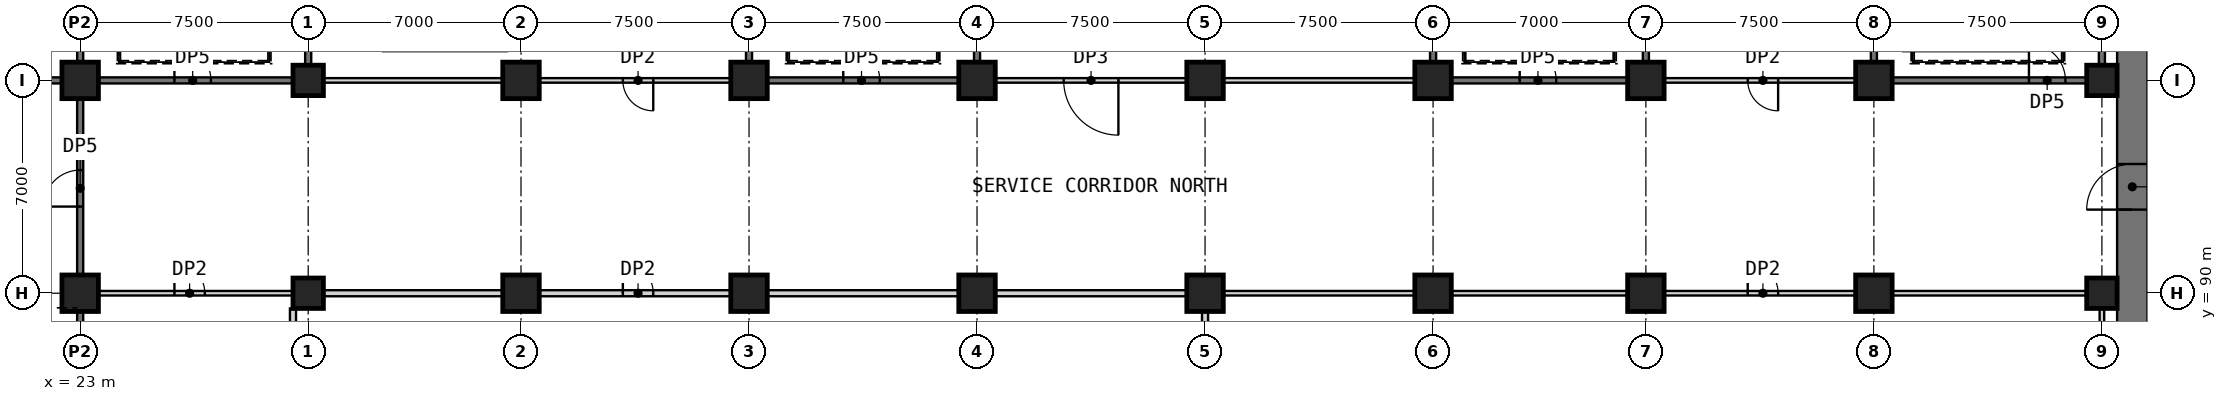
"""IFC4 building model, lengths in metres.
Left out: names, types, materials, properties, quantities, classifications, styles, units other than length and angle.
Written with IfcOpenShell. Run it as: python <this file> out.ifc"""

import sys

from ifc_helpers import new_model, si_unit, direction, frame, frame_2d, origin, origin_2d, place, context, subcontext, project, spatial, rectangle, extrude, element, fill, save


model = new_model("IFC4")
c1 = context("Model", 3, precision=1e-05, world=origin(), true_north=direction((0.0, 1.0)))
c2 = subcontext(c1, "Body", "Model", "MODEL_VIEW")
j1 = project(units=[si_unit("LENGTHUNIT", "METRE"), si_unit("PLANEANGLEUNIT", "RADIAN")], contexts=[c1])
p1 = place(None, origin())
s1 = spatial("IfcSite", under=j1, at=p1, CompositionType="ELEMENT")
p2 = place(p1, origin())
s2 = spatial("IfcBuilding", under=s1, at=p2, CompositionType="ELEMENT")
p3 = place(p2, frame((0.0, 0.0, -6.0)))
s3 = spatial("IfcBuildingStorey", under=s2, at=p3, CompositionType="ELEMENT", Elevation=-6.0)
p4 = place(p3, frame((90.5, 25.0, 0.0), z_axis=(0.0, 0.0, 1.0), x_axis=(0.0, 1.0, 0.0)))
e1 = element("IfcWall", 1, at=p4, inside=s3, PredefinedType="SHEAR", context=c2, shape_type="SweptSolid", body=[
    extrude(rectangle(XDim=92.5, YDim=1.0, at=frame_2d((46.25, 0.0))), origin(), (0.0, 0.0, 1.0), 4.8),
])
p5 = place(p4, frame((23.15, 0.0, 0.0)))
e2 = element("IfcOpeningElement", 2, at=p5, cuts=e1, PredefinedType="OPENING", context=c2, shape_type="SweptSolid", body=[
    extrude(rectangle(XDim=1.5, YDim=2.1, at=frame_2d((0.75, 1.05))), frame((0.0, 0.51, 0.0), z_axis=(0.0, -1.0, 0.0), x_axis=(1.0, 0.0, 0.0)), (0.0, 0.0, 1.0), 1.02),
])
p6 = place(p4, frame((67.75, 0.0, 0.0)))
e3 = element("IfcOpeningElement", 3, at=p6, cuts=e1, PredefinedType="OPENING", context=c2, shape_type="SweptSolid", body=[
    extrude(rectangle(XDim=1.5, YDim=2.1, at=frame_2d((0.75, 1.05))), frame((0.0, 0.51, 0.0), z_axis=(0.0, -1.0, 0.0), x_axis=(1.0, 0.0, 0.0)), (0.0, 0.0, 1.0), 1.02),
])
for number, where, z_axis, x_axis in (
    (4, (30.5, 90.0, 0.0), (0.0, 0.0, 1.0), (1.0, 0.0, 0.0)),
    (5, (30.5, 97.0, 0.0), (0.0, 0.0, 1.0), (1.0, 0.0, 0.0)),
):
    element("IfcColumn", number, at=place(p3, frame(where, z_axis=z_axis, x_axis=x_axis)), inside=s3, PredefinedType="COLUMN", context=c2, shape_type="SweptSolid", body=[
        extrude(rectangle(XDim=1.0, YDim=1.0, at=origin_2d()), origin(), (0.0, 0.0, 1.0), 6.0),
    ])
for number, where, z_axis, x_axis in (
    (6, (37.5, 90.0, 0.0), (0.0, 0.0, 1.0), (1.0, 0.0, 0.0)),
    (7, (37.5, 97.0, 0.0), (0.0, 0.0, 1.0), (1.0, 0.0, 0.0)),
    (8, (45.0, 90.0, 0.0), (0.0, 0.0, 1.0), (1.0, 0.0, 0.0)),
    (9, (45.0, 97.0, 0.0), (0.0, 0.0, 1.0), (1.0, 0.0, 0.0)),
    (10, (52.5, 90.0, 0.0), (0.0, 0.0, 1.0), (1.0, 0.0, 0.0)),
    (11, (52.5, 97.0, 0.0), (0.0, 0.0, 1.0), (1.0, 0.0, 0.0)),
    (12, (60.0, 90.0, 0.0), (0.0, 0.0, 1.0), (1.0, 0.0, 0.0)),
    (13, (60.0, 97.0, 0.0), (0.0, 0.0, 1.0), (1.0, 0.0, 0.0)),
    (14, (67.5, 90.0, 0.0), (0.0, 0.0, 1.0), (1.0, 0.0, 0.0)),
    (15, (67.5, 97.0, 0.0), (0.0, 0.0, 1.0), (1.0, 0.0, 0.0)),
    (16, (74.5, 90.0, 0.0), (0.0, 0.0, 1.0), (1.0, 0.0, 0.0)),
    (17, (74.5, 97.0, 0.0), (0.0, 0.0, 1.0), (1.0, 0.0, 0.0)),
    (18, (82.0, 90.0, 0.0), (0.0, 0.0, 1.0), (1.0, 0.0, 0.0)),
    (19, (82.0, 97.0, 0.0), (0.0, 0.0, 1.0), (1.0, 0.0, 0.0)),
):
    element("IfcColumn", number, at=place(p3, frame(where, z_axis=z_axis, x_axis=x_axis)), inside=s3, PredefinedType="COLUMN", context=c2, shape_type="SweptSolid", body=[
        extrude(rectangle(XDim=1.2, YDim=1.2, at=origin_2d()), origin(), (0.0, 0.0, 1.0), 6.0),
    ])
for number, where, z_axis, x_axis in (
    (20, (89.5, 90.0, 0.0), (0.0, 0.0, 1.0), (1.0, 0.0, 0.0)),
    (21, (89.5, 97.0, 0.0), (0.0, 0.0, 1.0), (1.0, 0.0, 0.0)),
):
    element("IfcColumn", number, at=place(p3, frame(where, z_axis=z_axis, x_axis=x_axis)), inside=s3, PredefinedType="COLUMN", context=c2, shape_type="SweptSolid", body=[
        extrude(rectangle(XDim=1.0, YDim=1.0, at=origin_2d()), origin(), (0.0, 0.0, 1.0), 6.0),
    ])
for number, where, z_axis, x_axis in (
    (22, (23.0, 90.0, 0.0), (0.0, 0.0, 1.0), (1.0, 0.0, 0.0)),
    (23, (23.0, 97.0, 0.0), (0.0, 0.0, 1.0), (1.0, 0.0, 0.0)),
):
    element("IfcColumn", number, at=place(p3, frame(where, z_axis=z_axis, x_axis=x_axis)), inside=s3, PredefinedType="COLUMN", context=c2, shape_type="SweptSolid", body=[
        extrude(rectangle(XDim=1.2, YDim=1.2, at=origin_2d()), origin(), (0.0, 0.0, 1.0), 6.0),
    ])
p7 = place(p3, frame((23.6, 90.0, 0.0), z_axis=(0.0, 0.0, 1.0), x_axis=(1.0, 0.0, 0.0)))
e24 = element("IfcWall", 24, at=p7, inside=s3, PredefinedType="PARTITIONING", context=c2, shape_type="SweptSolid", body=[
    extrude(rectangle(XDim=6.4, YDim=0.15, at=frame_2d((3.2, 0.0))), origin(), (0.0, 0.0, 1.0), 5.7),
])
p8 = place(p7, frame((2.5, 0.0, 0.0)))
e25 = element("IfcOpeningElement", 25, at=p8, cuts=e24, PredefinedType="OPENING", context=c2, shape_type="SweptSolid", body=[
    extrude(rectangle(XDim=1.0, YDim=2.1, at=frame_2d((0.5, 1.05))), frame((0.0, 0.085, 0.0), z_axis=(0.0, -1.0, 0.0), x_axis=(1.0, 0.0, 0.0)), (0.0, 0.0, 1.0), 0.17),
])
p9 = place(p3, frame((31.0, 90.0, 0.0), z_axis=(0.0, 0.0, 1.0), x_axis=(1.0, 0.0, 0.0)))
e26 = element("IfcWall", 26, at=p9, inside=s3, PredefinedType="PARTITIONING", context=c2, shape_type="SweptSolid", body=[
    extrude(rectangle(XDim=5.9, YDim=0.2, at=frame_2d((2.95, 0.0))), origin(), (0.0, 0.0, 1.0), 5.7),
])
p10 = place(p3, frame((38.1, 90.0, 0.0), z_axis=(0.0, 0.0, 1.0), x_axis=(1.0, 0.0, 0.0)))
e27 = element("IfcWall", 27, at=p10, inside=s3, PredefinedType="PARTITIONING", context=c2, shape_type="SweptSolid", body=[
    extrude(rectangle(XDim=6.3, YDim=0.2, at=frame_2d((3.15, 0.0))), origin(), (0.0, 0.0, 1.0), 5.7),
])
p11 = place(p10, frame((2.75, 0.0, 0.0)))
e28 = element("IfcOpeningElement", 28, at=p11, cuts=e27, PredefinedType="OPENING", context=c2, shape_type="SweptSolid", body=[
    extrude(rectangle(XDim=1.0, YDim=2.1, at=frame_2d((0.5, 1.05))), frame((0.0, 0.11, 0.0), z_axis=(0.0, -1.0, 0.0), x_axis=(1.0, 0.0, 0.0)), (0.0, 0.0, 1.0), 0.22),
])
for number, where, z_axis, x_axis in (
    (29, (45.6, 90.0, 0.0), (0.0, 0.0, 1.0), (1.0, 0.0, 0.0)),
    (30, (53.1, 90.0, 0.0), (0.0, 0.0, 1.0), (1.0, 0.0, 0.0)),
):
    element("IfcWall", number, at=place(p3, frame(where, z_axis=z_axis, x_axis=x_axis)), inside=s3, PredefinedType="PARTITIONING", context=c2, shape_type="SweptSolid", body=[
        extrude(rectangle(XDim=6.3, YDim=0.2, at=frame_2d((3.15, 0.0))), origin(), (0.0, 0.0, 1.0), 5.7),
    ])
p12 = place(p3, frame((60.6, 90.0, 0.0), z_axis=(0.0, 0.0, 1.0), x_axis=(1.0, 0.0, 0.0)))
e31 = element("IfcWall", 31, at=p12, inside=s3, PredefinedType="PARTITIONING", context=c2, shape_type="SweptSolid", body=[
    extrude(rectangle(XDim=6.3, YDim=0.15, at=frame_2d((3.15, 0.0))), origin(), (0.0, 0.0, 1.0), 5.7),
])
p13 = place(p3, frame((68.1, 90.0, 0.0), z_axis=(0.0, 0.0, 1.0), x_axis=(1.0, 0.0, 0.0)))
e32 = element("IfcWall", 32, at=p13, inside=s3, PredefinedType="PARTITIONING", context=c2, shape_type="SweptSolid", body=[
    extrude(rectangle(XDim=5.8, YDim=0.15, at=frame_2d((2.9, 0.0))), origin(), (0.0, 0.0, 1.0), 5.7),
])
p14 = place(p3, frame((75.1, 90.0, 0.0), z_axis=(0.0, 0.0, 1.0), x_axis=(1.0, 0.0, 0.0)))
e33 = element("IfcWall", 33, at=p14, inside=s3, PredefinedType="PARTITIONING", context=c2, shape_type="SweptSolid", body=[
    extrude(rectangle(XDim=6.3, YDim=0.15, at=frame_2d((3.15, 0.0))), origin(), (0.0, 0.0, 1.0), 5.7),
])
p15 = place(p14, frame((2.75, 0.0, 0.0)))
e34 = element("IfcOpeningElement", 34, at=p15, cuts=e33, PredefinedType="OPENING", context=c2, shape_type="SweptSolid", body=[
    extrude(rectangle(XDim=1.0, YDim=2.1, at=frame_2d((0.5, 1.05))), frame((0.0, 0.085, 0.0), z_axis=(0.0, -1.0, 0.0), x_axis=(1.0, 0.0, 0.0)), (0.0, 0.0, 1.0), 0.17),
])
p16 = place(p3, frame((82.6, 90.0, 0.0), z_axis=(0.0, 0.0, 1.0), x_axis=(1.0, 0.0, 0.0)))
e35 = element("IfcWall", 35, at=p16, inside=s3, PredefinedType="PARTITIONING", context=c2, shape_type="SweptSolid", body=[
    extrude(rectangle(XDim=6.4, YDim=0.15, at=frame_2d((3.2, 0.0))), origin(), (0.0, 0.0, 1.0), 5.7),
])
p17 = place(p3, frame((16.1, 97.0, 0.0), z_axis=(0.0, 0.0, 1.0), x_axis=(1.0, 0.0, 0.0)))
e36 = element("IfcWall", 36, at=p17, inside=s3, PredefinedType="SHEAR", context=c2, shape_type="SweptSolid", body=[
    extrude(rectangle(XDim=6.3, YDim=0.2, at=frame_2d((3.15, 0.0))), origin(), (0.0, 0.0, 1.0), 5.7),
])
p18 = place(p3, frame((23.6, 97.0, 0.0), z_axis=(0.0, 0.0, 1.0), x_axis=(1.0, 0.0, 0.0)))
e37 = element("IfcWall", 37, at=p18, inside=s3, PredefinedType="SHEAR", context=c2, shape_type="SweptSolid", body=[
    extrude(rectangle(XDim=6.4, YDim=0.2, at=frame_2d((3.2, 0.0))), origin(), (0.0, 0.0, 1.0), 5.7),
])
p19 = place(p18, frame((2.5, 0.0, 0.0)))
e38 = element("IfcOpeningElement", 38, at=p19, cuts=e37, PredefinedType="OPENING", context=c2, shape_type="SweptSolid", body=[
    extrude(rectangle(XDim=1.2, YDim=2.1, at=frame_2d((0.6, 1.05))), frame((0.0, 0.11, 0.0), z_axis=(0.0, -1.0, 0.0), x_axis=(1.0, 0.0, 0.0)), (0.0, 0.0, 1.0), 0.22),
])
p20 = place(p3, frame((31.0, 97.0, 0.0), z_axis=(0.0, 0.0, 1.0), x_axis=(1.0, 0.0, 0.0)))
e39 = element("IfcWall", 39, at=p20, inside=s3, PredefinedType="PARTITIONING", context=c2, shape_type="SweptSolid", body=[
    extrude(rectangle(XDim=5.9, YDim=0.15, at=frame_2d((2.95, 0.0))), origin(), (0.0, 0.0, 1.0), 5.7),
])
p21 = place(p3, frame((44.4, 97.0, 0.0), z_axis=(0.0, 0.0, 1.0), x_axis=(-1.0, 0.0, 0.0)))
e40 = element("IfcWall", 40, at=p21, inside=s3, PredefinedType="PARTITIONING", context=c2, shape_type="SweptSolid", body=[
    extrude(rectangle(XDim=6.3, YDim=0.15, at=frame_2d((3.15, 0.0))), origin(), (0.0, 0.0, 1.0), 5.7),
])
p22 = place(p21, frame((2.55, 0.0, 0.0)))
e41 = element("IfcOpeningElement", 41, at=p22, cuts=e40, PredefinedType="OPENING", context=c2, shape_type="SweptSolid", body=[
    extrude(rectangle(XDim=1.0, YDim=2.1, at=frame_2d((0.5, 1.05))), frame((0.0, 0.085, 0.0), z_axis=(0.0, -1.0, 0.0), x_axis=(1.0, 0.0, 0.0)), (0.0, 0.0, 1.0), 0.17),
])
p23 = place(p3, frame((45.6, 97.0, 0.0), z_axis=(0.0, 0.0, 1.0), x_axis=(1.0, 0.0, 0.0)))
e42 = element("IfcWall", 42, at=p23, inside=s3, PredefinedType="SHEAR", context=c2, shape_type="SweptSolid", body=[
    extrude(rectangle(XDim=6.3, YDim=0.2, at=frame_2d((3.15, 0.0))), origin(), (0.0, 0.0, 1.0), 5.7),
])
p24 = place(p23, frame((2.5, 0.0, 0.0)))
e43 = element("IfcOpeningElement", 43, at=p24, cuts=e42, PredefinedType="OPENING", context=c2, shape_type="SweptSolid", body=[
    extrude(rectangle(XDim=1.2, YDim=2.1, at=frame_2d((0.6, 1.05))), frame((0.0, 0.11, 0.0), z_axis=(0.0, -1.0, 0.0), x_axis=(1.0, 0.0, 0.0)), (0.0, 0.0, 1.0), 0.22),
])
p25 = place(p3, frame((59.4, 97.0, 0.0), z_axis=(0.0, 0.0, 1.0), x_axis=(-1.0, 0.0, 0.0)))
e44 = element("IfcWall", 44, at=p25, inside=s3, PredefinedType="PARTITIONING", context=c2, shape_type="SweptSolid", body=[
    extrude(rectangle(XDim=6.3, YDim=0.15, at=frame_2d((3.15, 0.0))), origin(), (0.0, 0.0, 1.0), 5.7),
])
p26 = place(p25, frame((2.25, 0.0, 0.0)))
e45 = element("IfcOpeningElement", 45, at=p26, cuts=e44, PredefinedType="OPENING", context=c2, shape_type="SweptSolid", body=[
    extrude(rectangle(XDim=1.8, YDim=2.4, at=frame_2d((0.9, 1.2))), frame((0.0, 0.085, 0.0), z_axis=(0.0, -1.0, 0.0), x_axis=(1.0, 0.0, 0.0)), (0.0, 0.0, 1.0), 0.17),
])
p27 = place(p3, frame((60.6, 97.0, 0.0), z_axis=(0.0, 0.0, 1.0), x_axis=(1.0, 0.0, 0.0)))
e46 = element("IfcWall", 46, at=p27, inside=s3, PredefinedType="PARTITIONING", context=c2, shape_type="SweptSolid", body=[
    extrude(rectangle(XDim=6.3, YDim=0.15, at=frame_2d((3.15, 0.0))), origin(), (0.0, 0.0, 1.0), 5.7),
])
p28 = place(p3, frame((68.1, 97.0, 0.0), z_axis=(0.0, 0.0, 1.0), x_axis=(1.0, 0.0, 0.0)))
e47 = element("IfcWall", 47, at=p28, inside=s3, PredefinedType="SHEAR", context=c2, shape_type="SweptSolid", body=[
    extrude(rectangle(XDim=5.8, YDim=0.2, at=frame_2d((2.9, 0.0))), origin(), (0.0, 0.0, 1.0), 5.7),
])
p29 = place(p28, frame((2.25, 0.0, 0.0)))
e48 = element("IfcOpeningElement", 48, at=p29, cuts=e47, PredefinedType="OPENING", context=c2, shape_type="SweptSolid", body=[
    extrude(rectangle(XDim=1.2, YDim=2.1, at=frame_2d((0.6, 1.05))), frame((0.0, 0.11, 0.0), z_axis=(0.0, -1.0, 0.0), x_axis=(1.0, 0.0, 0.0)), (0.0, 0.0, 1.0), 0.22),
])
p30 = place(p3, frame((81.4, 97.0, 0.0), z_axis=(0.0, 0.0, 1.0), x_axis=(-1.0, 0.0, 0.0)))
e49 = element("IfcWall", 49, at=p30, inside=s3, PredefinedType="PARTITIONING", context=c2, shape_type="SweptSolid", body=[
    extrude(rectangle(XDim=6.3, YDim=0.15, at=frame_2d((3.15, 0.0))), origin(), (0.0, 0.0, 1.0), 5.7),
])
p31 = place(p30, frame((2.55, 0.0, 0.0)))
e50 = element("IfcOpeningElement", 50, at=p31, cuts=e49, PredefinedType="OPENING", context=c2, shape_type="SweptSolid", body=[
    extrude(rectangle(XDim=1.0, YDim=2.1, at=frame_2d((0.5, 1.05))), frame((0.0, 0.085, 0.0), z_axis=(0.0, -1.0, 0.0), x_axis=(1.0, 0.0, 0.0)), (0.0, 0.0, 1.0), 0.17),
])
p32 = place(p3, frame((82.6, 97.0, 0.0), z_axis=(0.0, 0.0, 1.0), x_axis=(1.0, 0.0, 0.0)))
e51 = element("IfcWall", 51, at=p32, inside=s3, PredefinedType="SHEAR", context=c2, shape_type="SweptSolid", body=[
    extrude(rectangle(XDim=6.4, YDim=0.2, at=frame_2d((3.2, 0.0))), origin(), (0.0, 0.0, 1.0), 5.7),
])
p33 = place(p32, frame((4.5, 0.0, 0.0)))
e52 = element("IfcOpeningElement", 52, at=p33, cuts=e51, PredefinedType="OPENING", context=c2, shape_type="SweptSolid", body=[
    extrude(rectangle(XDim=1.2, YDim=2.1, at=frame_2d((0.6, 1.05))), frame((0.0, 0.11, 0.0), z_axis=(0.0, -1.0, 0.0), x_axis=(1.0, 0.0, 0.0)), (0.0, 0.0, 1.0), 0.22),
])
p34 = place(p3, frame((23.0, 83.1, 0.0), z_axis=(0.0, 0.0, 1.0), x_axis=(0.0, 1.0, 0.0)))
e53 = element("IfcWall", 53, at=p34, inside=s3, PredefinedType="SHEAR", context=c2, shape_type="SweptSolid", body=[
    extrude(rectangle(XDim=6.3, YDim=0.2, at=frame_2d((3.15, 0.0))), origin(), (0.0, 0.0, 1.0), 5.7),
])
p35 = place(p3, frame((23.0, 90.6, 0.0), z_axis=(0.0, 0.0, 1.0), x_axis=(0.0, 1.0, 0.0)))
e54 = element("IfcWall", 54, at=p35, inside=s3, PredefinedType="SHEAR", context=c2, shape_type="SweptSolid", body=[
    extrude(rectangle(XDim=5.8, YDim=0.2, at=frame_2d((2.9, 0.0))), origin(), (0.0, 0.0, 1.0), 5.7),
])
p36 = place(p35, frame((2.25, 0.0, 0.0)))
e55 = element("IfcOpeningElement", 55, at=p36, cuts=e54, PredefinedType="OPENING", context=c2, shape_type="SweptSolid", body=[
    extrude(rectangle(XDim=1.2, YDim=2.1, at=frame_2d((0.6, 1.05))), frame((0.0, 0.11, 0.0), z_axis=(0.0, -1.0, 0.0), x_axis=(1.0, 0.0, 0.0)), (0.0, 0.0, 1.0), 0.22),
])
p37 = place(p3, frame((23.0, 97.6, 0.0), z_axis=(0.0, 0.0, 1.0), x_axis=(0.0, 1.0, 0.0)))
e56 = element("IfcWall", 56, at=p37, inside=s3, PredefinedType="SHEAR", context=c2, shape_type="SweptSolid", body=[
    extrude(rectangle(XDim=6.3, YDim=0.2, at=frame_2d((3.15, 0.0))), origin(), (0.0, 0.0, 1.0), 5.7),
])
for number, where, z_axis, x_axis in (
    (57, (30.5, 97.5, 0.0), (0.0, 0.0, 1.0), (0.0, 1.0, 0.0)),
    (58, (45.0, 97.6, 0.0), (0.0, 0.0, 1.0), (0.0, 1.0, 0.0)),
    (59, (52.5, 97.6, 0.0), (0.0, 0.0, 1.0), (0.0, 1.0, 0.0)),
    (60, (67.5, 97.6, 0.0), (0.0, 0.0, 1.0), (0.0, 1.0, 0.0)),
    (61, (74.5, 97.6, 0.0), (0.0, 0.0, 1.0), (0.0, 1.0, 0.0)),
    (62, (82.0, 97.6, 0.0), (0.0, 0.0, 1.0), (0.0, 1.0, 0.0)),
):
    element("IfcWall", number, at=place(p3, frame(where, z_axis=z_axis, x_axis=x_axis)), inside=s3, PredefinedType="SHEAR", context=c2, shape_type="SweptSolid", body=[
        extrude(rectangle(XDim=6.4, YDim=0.2, at=frame_2d((3.2, 0.0))), origin(), (0.0, 0.0, 1.0), 5.7),
    ])
p38 = place(p3, frame((89.5, 83.0, 0.0), z_axis=(0.0, 0.0, 1.0), x_axis=(0.0, 1.0, 0.0)))
e63 = element("IfcWall", 63, at=p38, inside=s3, PredefinedType="PARTITIONING", context=c2, shape_type="SweptSolid", body=[
    extrude(rectangle(XDim=6.5, YDim=0.15, at=frame_2d((3.25, 0.0))), origin(), (0.0, 0.0, 1.0), 5.7),
])
p39 = place(p3, frame((89.5, 97.5, 0.0), z_axis=(0.0, 0.0, 1.0), x_axis=(0.0, 1.0, 0.0)))
e64 = element("IfcWall", 64, at=p39, inside=s3, PredefinedType="SHEAR", context=c2, shape_type="SweptSolid", body=[
    extrude(rectangle(XDim=6.4, YDim=0.2, at=frame_2d((3.2, 0.0))), origin(), (0.0, 0.0, 1.0), 5.7),
])
p40 = place(p3, frame((30.0, 82.6, 0.0), z_axis=(0.0, 0.0, 1.0), x_axis=(0.0, 1.0, 0.0)))
e65 = element("IfcWall", 65, at=p40, inside=s3, PredefinedType="PARTITIONING", context=c2, shape_type="SweptSolid", body=[
    extrude(rectangle(XDim=6.9, YDim=0.2, at=frame_2d((3.45, 0.0))), origin(), (0.0, 0.0, 1.0), 5.7),
])
p41 = place(p3, frame((60.0, 82.6, 0.0), z_axis=(0.0, 0.0, 1.0), x_axis=(0.0, 1.0, 0.0)))
e66 = element("IfcWall", 66, at=p41, inside=s3, PredefinedType="PARTITIONING", context=c2, shape_type="SweptSolid", body=[
    extrude(rectangle(XDim=6.8, YDim=0.2, at=frame_2d((3.4, 0.0))), origin(), (0.0, 0.0, 1.0), 5.7),
])
p42 = place(p8, origin())
e67 = element("IfcDoor", 67, at=p42, inside=s3, OperationType="SINGLE_SWING_LEFT", PredefinedType="DOOR", context=c2, shape_type="SweptSolid", body=[
    extrude(rectangle(XDim=1.0, YDim=2.1, at=frame_2d((0.5, 1.05))), frame((0.0, 0.025, 0.0), z_axis=(0.0, -1.0, 0.0), x_axis=(1.0, 0.0, 0.0)), (0.0, 0.0, 1.0), 0.05),
])
fill(e25, e67)
p43 = place(p11, origin())
e68 = element("IfcDoor", 68, at=p43, inside=s3, OperationType="SINGLE_SWING_LEFT", PredefinedType="DOOR", context=c2, shape_type="SweptSolid", body=[
    extrude(rectangle(XDim=1.0, YDim=2.1, at=frame_2d((0.5, 1.05))), frame((0.0, 0.025, 0.0), z_axis=(0.0, -1.0, 0.0), x_axis=(1.0, 0.0, 0.0)), (0.0, 0.0, 1.0), 0.05),
])
fill(e28, e68)
p44 = place(p15, origin())
e69 = element("IfcDoor", 69, at=p44, inside=s3, OperationType="SINGLE_SWING_LEFT", PredefinedType="DOOR", context=c2, shape_type="SweptSolid", body=[
    extrude(rectangle(XDim=1.0, YDim=2.1, at=frame_2d((0.5, 1.05))), frame((0.0, 0.025, 0.0), z_axis=(0.0, -1.0, 0.0), x_axis=(1.0, 0.0, 0.0)), (0.0, 0.0, 1.0), 0.05),
])
fill(e34, e69)
p45 = place(p19, origin())
e70 = element("IfcDoor", 70, at=p45, inside=s3, OperationType="SINGLE_SWING_LEFT", PredefinedType="DOOR", context=c2, shape_type="SweptSolid", body=[
    extrude(rectangle(XDim=1.2, YDim=2.1, at=frame_2d((0.6, 1.05))), frame((0.0, 0.025, 0.0), z_axis=(0.0, -1.0, 0.0), x_axis=(1.0, 0.0, 0.0)), (0.0, 0.0, 1.0), 0.05),
])
fill(e38, e70)
p46 = place(p22, origin())
e71 = element("IfcDoor", 71, at=p46, inside=s3, OperationType="SINGLE_SWING_LEFT", PredefinedType="DOOR", context=c2, shape_type="SweptSolid", body=[
    extrude(rectangle(XDim=1.0, YDim=2.1, at=frame_2d((0.5, 1.05))), frame((0.0, 0.025, 0.0), z_axis=(0.0, -1.0, 0.0), x_axis=(1.0, 0.0, 0.0)), (0.0, 0.0, 1.0), 0.05),
])
fill(e41, e71)
p47 = place(p24, origin())
e72 = element("IfcDoor", 72, at=p47, inside=s3, OperationType="SINGLE_SWING_LEFT", PredefinedType="DOOR", context=c2, shape_type="SweptSolid", body=[
    extrude(rectangle(XDim=1.2, YDim=2.1, at=frame_2d((0.6, 1.05))), frame((0.0, 0.025, 0.0), z_axis=(0.0, -1.0, 0.0), x_axis=(1.0, 0.0, 0.0)), (0.0, 0.0, 1.0), 0.05),
])
fill(e43, e72)
p48 = place(p26, origin())
e73 = element("IfcDoor", 73, at=p48, inside=s3, OperationType="SINGLE_SWING_LEFT", PredefinedType="DOOR", context=c2, shape_type="SweptSolid", body=[
    extrude(rectangle(XDim=1.8, YDim=2.4, at=frame_2d((0.9, 1.2))), frame((0.0, 0.025, 0.0), z_axis=(0.0, -1.0, 0.0), x_axis=(1.0, 0.0, 0.0)), (0.0, 0.0, 1.0), 0.05),
])
fill(e45, e73)
p49 = place(p29, origin())
e74 = element("IfcDoor", 74, at=p49, inside=s3, OperationType="SINGLE_SWING_LEFT", PredefinedType="DOOR", context=c2, shape_type="SweptSolid", body=[
    extrude(rectangle(XDim=1.2, YDim=2.1, at=frame_2d((0.6, 1.05))), frame((0.0, 0.025, 0.0), z_axis=(0.0, -1.0, 0.0), x_axis=(1.0, 0.0, 0.0)), (0.0, 0.0, 1.0), 0.05),
])
fill(e48, e74)
p50 = place(p31, origin())
e75 = element("IfcDoor", 75, at=p50, inside=s3, OperationType="SINGLE_SWING_LEFT", PredefinedType="DOOR", context=c2, shape_type="SweptSolid", body=[
    extrude(rectangle(XDim=1.0, YDim=2.1, at=frame_2d((0.5, 1.05))), frame((0.0, 0.025, 0.0), z_axis=(0.0, -1.0, 0.0), x_axis=(1.0, 0.0, 0.0)), (0.0, 0.0, 1.0), 0.05),
])
fill(e50, e75)
p51 = place(p33, origin())
e76 = element("IfcDoor", 76, at=p51, inside=s3, OperationType="SINGLE_SWING_LEFT", PredefinedType="DOOR", context=c2, shape_type="SweptSolid", body=[
    extrude(rectangle(XDim=1.2, YDim=2.1, at=frame_2d((0.6, 1.05))), frame((0.0, 0.025, 0.0), z_axis=(0.0, -1.0, 0.0), x_axis=(1.0, 0.0, 0.0)), (0.0, 0.0, 1.0), 0.05),
])
fill(e52, e76)
p52 = place(p36, origin())
e77 = element("IfcDoor", 77, at=p52, inside=s3, OperationType="SINGLE_SWING_LEFT", PredefinedType="DOOR", context=c2, shape_type="SweptSolid", body=[
    extrude(rectangle(XDim=1.2, YDim=2.1, at=frame_2d((0.6, 1.05))), frame((0.0, 0.025, 0.0), z_axis=(0.0, -1.0, 0.0), x_axis=(1.0, 0.0, 0.0)), (0.0, 0.0, 1.0), 0.05),
])
fill(e55, e77)
p53 = place(p6, origin())
e78 = element("IfcDoor", 78, at=p53, inside=s3, OperationType="SINGLE_SWING_LEFT", PredefinedType="DOOR", context=c2, shape_type="SweptSolid", body=[
    extrude(rectangle(XDim=1.5, YDim=2.1, at=frame_2d((0.75, 1.05))), frame((0.0, 0.025, 0.0), z_axis=(0.0, -1.0, 0.0), x_axis=(1.0, 0.0, 0.0)), (0.0, 0.0, 1.0), 0.05),
])
fill(e3, e78)
save(model, sys.argv[1])
